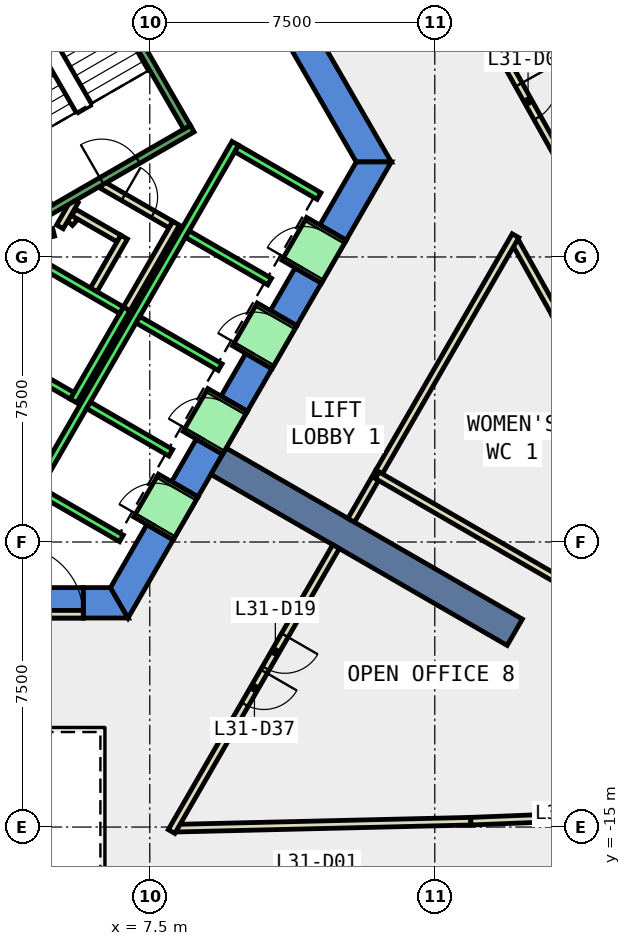
"""IFC4 building model, lengths in metres.
Left out: names, types, materials, properties, quantities, classifications, styles, units other than length and angle.
Written with IfcOpenShell. Run it as: python <this file> out.ifc"""

import sys

from ifc_helpers import new_model, si_unit, direction, frame, frame_2d, origin, place, context, subcontext, project, spatial, polyline, rectangle, outline, extrude, element, fill, save


model = new_model("IFC4")
c1 = context("Model", 3, precision=1e-05, world=origin(), true_north=direction((0.0, 1.0)))
c2 = subcontext(c1, "Body", "Model", "MODEL_VIEW")
j1 = project(units=[si_unit("LENGTHUNIT", "METRE"), si_unit("PLANEANGLEUNIT", "RADIAN")], contexts=[c1])
p1 = place(None, origin())
s1 = spatial("IfcSite", under=j1, at=p1, CompositionType="ELEMENT")
p2 = place(p1, origin())
s2 = spatial("IfcBuilding", under=s1, at=p2, CompositionType="ELEMENT")
p3 = place(p2, frame((0.0, 0.0, 142.4)))
s3 = spatial("IfcBuildingStorey", under=s2, at=p3, CompositionType="ELEMENT", Elevation=142.4)
p4 = place(p3, frame((0.0, 0.0, -0.4)))
e1 = element("IfcWall", 1, at=p4, inside=s3, PredefinedType="SHEAR", context=c2, shape_type="SweptSolid", body=[
    extrude(outline(polyline([(8.517, 11.748), (7.824, 11.348), (12.933, 2.5), (13.856, 2.5), (8.517, 11.748)])), origin(), (0.0, 0.0, 1.0), 4.2),
])
p5 = place(p3, frame((0.0, 0.0, -0.4)))
e2 = element("IfcWall", 2, at=p5, inside=s3, PredefinedType="SHEAR", context=c2, shape_type="SweptSolid", body=[
    extrude(outline(polyline([(5.75, -8.7), (5.75, -9.5), (6.928, -9.5), (6.466, -8.7), (5.75, -8.7)])), origin(), (0.0, 0.0, 1.0), 4.2),
])
p6 = place(p3, frame((0.0, 0.0, 3.6)))
e3 = element("IfcWall", 3, at=p6, inside=s3, PredefinedType="SHEAR", context=c2, shape_type="SweptSolid", body=[
    extrude(outline(polyline([(5.75, -9.5), (5.75, -8.7), (3.75, -8.7), (3.75, -9.5), (5.75, -9.5)])), origin(), (0.0, 0.0, 1.0), 0.2),
])
p7 = place(p3, frame((0.0, 0.0, -0.4)))
e4 = element("IfcWall", 4, at=p7, inside=s3, PredefinedType="SHEAR", context=c2, shape_type="SweptSolid", body=[
    extrude(outline(polyline([(8.117, -7.44), (7.424, -7.04), (6.466, -8.7), (6.928, -9.5), (8.117, -7.44)])), origin(), (0.0, 0.0, 1.0), 4.2),
])
p8 = place(p3, frame((0.0, 0.0, -0.4)))
e5 = element("IfcWall", 5, at=p8, inside=s3, PredefinedType="SHEAR", context=c2, shape_type="SweptSolid", body=[
    extrude(outline(polyline([(9.417, -5.189), (8.724, -4.789), (8.075, -5.914), (8.767, -6.314), (9.417, -5.189)])), origin(), (0.0, 0.0, 1.0), 4.2),
])
p9 = place(p3, frame((0.0, 0.0, -0.4)))
e6 = element("IfcWall", 6, at=p9, inside=s3, PredefinedType="SHEAR", context=c2, shape_type="SweptSolid", body=[
    extrude(outline(polyline([(10.717, -2.937), (10.025, -2.537), (9.374, -3.663), (10.067, -4.063), (10.717, -2.937)])), origin(), (0.0, 0.0, 1.0), 4.2),
])
p10 = place(p3, frame((0.0, 0.0, -0.4)))
e7 = element("IfcWall", 7, at=p10, inside=s3, PredefinedType="SHEAR", context=c2, shape_type="SweptSolid", body=[
    extrude(outline(polyline([(12.017, -0.686), (11.324, -0.286), (10.675, -1.411), (11.367, -1.811), (12.017, -0.686)])), origin(), (0.0, 0.0, 1.0), 4.2),
])
p11 = place(p3, frame((0.0, 0.0, -0.4)))
e8 = element("IfcWall", 8, at=p11, inside=s3, PredefinedType="SHEAR", context=c2, shape_type="SweptSolid", body=[
    extrude(outline(polyline([(11.974, 0.84), (12.667, 0.44), (13.856, 2.5), (12.933, 2.5), (11.974, 0.84)])), origin(), (0.0, 0.0, 1.0), 4.2),
])
p12 = place(p3, frame((0.0, 0.0, 3.6)))
e9 = element("IfcWall", 9, at=p12, inside=s3, PredefinedType="SHEAR", context=c2, shape_type="SweptSolid", body=[
    extrude(outline(polyline([(8.767, -6.314), (8.075, -5.914), (7.424, -7.04), (8.117, -7.44), (8.767, -6.314)])), origin(), (0.0, 0.0, 1.0), 0.2),
])
p13 = place(p3, frame((0.0, 0.0, 3.6)))
e10 = element("IfcWall", 10, at=p13, inside=s3, PredefinedType="SHEAR", context=c2, shape_type="SweptSolid", body=[
    extrude(outline(polyline([(10.067, -4.063), (9.374, -3.663), (8.724, -4.789), (9.417, -5.189), (10.067, -4.063)])), origin(), (0.0, 0.0, 1.0), 0.2),
])
p14 = place(p3, frame((0.0, 0.0, 3.6)))
e11 = element("IfcWall", 11, at=p14, inside=s3, PredefinedType="SHEAR", context=c2, shape_type="SweptSolid", body=[
    extrude(outline(polyline([(11.367, -1.811), (10.675, -1.411), (10.025, -2.537), (10.717, -2.937), (11.367, -1.811)])), origin(), (0.0, 0.0, 1.0), 0.2),
])
p15 = place(p3, frame((0.0, 0.0, 3.6)))
e12 = element("IfcWall", 12, at=p15, inside=s3, PredefinedType="SHEAR", context=c2, shape_type="SweptSolid", body=[
    extrude(outline(polyline([(12.667, 0.44), (11.974, 0.84), (11.324, -0.286), (12.017, -0.686), (12.667, 0.44)])), origin(), (0.0, 0.0, 1.0), 0.2),
])
p16 = place(p3, frame((9.31, -5.375, -0.4), z_axis=(0.0, 0.0, 1.0), x_axis=(0.866017533419, -0.500013631625, 0.0)))
e13 = element("IfcWall", 13, at=p16, inside=s3, PredefinedType="SHEAR", context=c2, shape_type="SweptSolid", body=[
    extrude(rectangle(XDim=9.0, YDim=0.8, at=frame_2d((4.5, 0.0))), origin(), (0.0, 0.0, 1.0), 4.2),
])
p17 = place(p3, frame((8.223, -15.029, 0.0), z_axis=(0.0, 0.0, 1.0), x_axis=(0.99971920994, 0.023696018186, 0.0)))
e14 = element("IfcWall", 14, at=p17, inside=s3, PredefinedType="PARTITIONING", context=c2, shape_type="SweptSolid", body=[
    extrude(rectangle(XDim=7.727, YDim=0.2, at=frame_2d((3.864, 0.0))), origin(), (0.0, 0.0, 1.0), 3.8),
])
p18 = place(p3, frame((15.948, -14.846, 0.0), z_axis=(0.0, 0.0, 1.0), x_axis=(0.999208477774, 0.039779617206, 0.0)))
e15 = element("IfcWall", 15, at=p18, inside=s3, PredefinedType="PARTITIONING", context=c2, shape_type="SweptSolid", body=[
    extrude(rectangle(XDim=2.639, YDim=0.2, at=frame_2d((1.32, 0.0))), origin(), (0.0, 0.0, 1.0), 3.8),
])
p19 = place(p3, frame((18.178, -1.501, 0.0), z_axis=(0.0, 0.0, 1.0), x_axis=(-0.487980809747, 0.872854357449, 0.0)))
e16 = element("IfcWall", 16, at=p19, inside=s3, PredefinedType="PARTITIONING", context=c2, shape_type="SweptSolid", body=[
    extrude(rectangle(XDim=2.162, YDim=0.2, at=frame_2d((1.081, 0.0))), origin(), (0.0, 0.0, 1.0), 3.8),
])
p20 = place(p3, frame((16.624, 5.582, 0.0), z_axis=(0.0, 0.0, 1.0), x_axis=(0.487871212611, -0.872915620152, 0.0)))
e17 = element("IfcWall", 17, at=p20, inside=s3, PredefinedType="PARTITIONING", context=c2, shape_type="SweptSolid", body=[
    extrude(rectangle(XDim=3.402, YDim=0.2, at=frame_2d((1.701, 0.0))), origin(), (0.0, 0.0, 1.0), 3.8),
])
p21 = place(p20, frame((1.202, 0.0, 0.0)))
e18 = element("IfcOpeningElement", 18, at=p21, cuts=e17, PredefinedType="OPENING", context=c2, shape_type="SweptSolid", body=[
    extrude(rectangle(XDim=1.0, YDim=2.1, at=frame_2d((0.5, 1.05))), frame((0.0, 0.11, 0.0), z_axis=(0.0, -1.0, 0.0), x_axis=(1.0, 0.0, 0.0)), (0.0, 0.0, 1.0), 0.22),
])
p22 = place(p3, frame((5.39, 0.898, 0.0), z_axis=(0.0, 0.0, 1.0), x_axis=(0.673828488714, 0.738887791073, 0.0)))
e19 = element("IfcWall", 19, at=p22, inside=s3, PredefinedType="PARTITIONING", context=c2, shape_type="SweptSolid", body=[
    extrude(rectangle(XDim=0.263, YDim=0.2, at=frame_2d((0.131, 0.0))), origin(), (0.0, 0.0, 1.0), 3.8),
])
p23 = place(p3, frame((5.499, 1.172, 0.0), z_axis=(0.0, 0.0, 1.0), x_axis=(0.866333505267, -0.499465972466, 0.0)))
e20 = element("IfcWall", 20, at=p23, inside=s3, PredefinedType="PARTITIONING", context=c2, shape_type="SweptSolid", body=[
    extrude(rectangle(XDim=1.374, YDim=0.2, at=frame_2d((0.687, 0.0))), origin(), (0.0, 0.0, 1.0), 3.8),
])
p24 = place(p3, frame((6.826, 0.522, 0.0), z_axis=(0.0, 0.0, 1.0), x_axis=(-0.500016722714, -0.866015748706, 0.0)))
e21 = element("IfcWall", 21, at=p24, inside=s3, PredefinedType="PARTITIONING", context=c2, shape_type="SweptSolid", body=[
    extrude(rectangle(XDim=1.7, YDim=0.2, at=frame_2d((0.85, 0.0))), origin(), (0.0, 0.0, 1.0), 3.8),
])
p25 = place(p3, frame((6.25, 1.894, 0.0), z_axis=(0.0, 0.0, 1.0), x_axis=(0.866043184279, -0.499969202016, 0.0)))
e22 = element("IfcWall", 22, at=p25, inside=s3, PredefinedType="PARTITIONING", context=c2, shape_type="SweptSolid", body=[
    extrude(rectangle(XDim=2.084, YDim=0.2, at=frame_2d((1.042, 0.0))), origin(), (0.0, 0.0, 1.0), 3.8),
])
p26 = place(p25, frame((0.642, 0.0, 0.0)))
e23 = element("IfcOpeningElement", 23, at=p26, cuts=e22, PredefinedType="OPENING", context=c2, shape_type="SweptSolid", body=[
    extrude(rectangle(XDim=0.9, YDim=2.1, at=frame_2d((0.45, 1.05))), frame((0.0, 0.11, 0.0), z_axis=(0.0, -1.0, 0.0), x_axis=(1.0, 0.0, 0.0)), (0.0, 0.0, 1.0), 0.22),
])
p27 = place(p3, frame((8.192, 0.888, 0.0), z_axis=(0.0, 0.0, 1.0), x_axis=(-0.499940625693, -0.866059680843, 0.0)))
e24 = element("IfcWall", 24, at=p27, inside=s3, PredefinedType="PARTITIONING", context=c2, shape_type="SweptSolid", body=[
    extrude(rectangle(XDim=2.68, YDim=0.2, at=frame_2d((1.34, 0.0))), origin(), (0.0, 0.0, 1.0), 3.8),
])
p28 = place(p3, frame((5.135, 0.793, 0.0), z_axis=(0.0, 0.0, 1.0), x_axis=(0.499526442893, 0.866298639529, 0.0)))
e25 = element("IfcWall", 25, at=p28, inside=s3, PredefinedType="PARTITIONING", context=c2, shape_type="SweptSolid", body=[
    extrude(rectangle(XDim=0.791, YDim=0.2, at=frame_2d((0.396, 0.0))), origin(), (0.0, 0.0, 1.0), 3.8),
])
p29 = place(p3, frame((4.644, 0.564, 0.0), z_axis=(0.0, 0.0, 1.0), x_axis=(0.969929076366, 0.243387729394, 0.0)))
e26 = element("IfcWall", 26, at=p29, inside=s3, PredefinedType="PARTITIONING", context=c2, shape_type="SweptSolid", body=[
    extrude(rectangle(XDim=0.337, YDim=0.2, at=frame_2d((0.168, 0.0))), origin(), (0.0, 0.0, 1.0), 3.8),
])
p30 = place(p3, frame((13.535, -5.657, 0.0), z_axis=(0.0, 0.0, 1.0), x_axis=(-0.499751238113, -0.866168978898, 0.0)))
e27 = element("IfcWall", 27, at=p30, inside=s3, PredefinedType="PARTITIONING", context=c2, shape_type="SweptSolid", body=[
    extrude(rectangle(XDim=1.469, YDim=0.2, at=frame_2d((0.734, 0.0))), origin(), (0.0, 0.0, 1.0), 3.8),
])
p31 = place(p3, frame((17.124, 0.56, 0.0), z_axis=(0.0, 0.0, 1.0), x_axis=(-0.49996876383, -0.866043437245, 0.0)))
e28 = element("IfcWall", 28, at=p31, inside=s3, PredefinedType="PARTITIONING", context=c2, shape_type="SweptSolid", body=[
    extrude(rectangle(XDim=7.179, YDim=0.2, at=frame_2d((3.589, 0.0))), origin(), (0.0, 0.0, 1.0), 3.8),
])
p32 = place(p3, frame((13.485, -5.744, 0.0), z_axis=(0.0, 0.0, 1.0), x_axis=(0.865950545648, -0.500129635687, 0.0)))
e29 = element("IfcWall", 29, at=p32, inside=s3, PredefinedType="PARTITIONING", context=c2, shape_type="SweptSolid", body=[
    extrude(rectangle(XDim=9.1, YDim=0.2, at=frame_2d((4.55, 0.0))), origin(), (0.0, 0.0, 1.0), 3.8),
])
p33 = place(p3, frame((3.75, -9.4, 0.0), z_axis=(0.0, 0.0, 1.0), x_axis=(1.0, 0.0, 0.0)))
e30 = element("IfcWall", 30, at=p33, inside=s3, PredefinedType="PARTITIONING", context=c2, shape_type="SweptSolid", body=[
    extrude(rectangle(XDim=2.0, YDim=0.2, at=frame_2d((1.0, 0.0))), origin(), (0.0, 0.0, 1.0), 2.4),
])
p34 = place(p33, frame((0.19, 0.0, 0.0)))
e31 = element("IfcOpeningElement", 31, at=p34, cuts=e30, PredefinedType="OPENING", context=c2, shape_type="SweptSolid", body=[
    extrude(rectangle(XDim=1.8, YDim=2.1, at=frame_2d((0.9, 1.05))), frame((0.0, 0.11, 0.0), z_axis=(0.0, -1.0, 0.0), x_axis=(1.0, 0.0, 0.0)), (0.0, 0.0, 1.0), 0.22),
])
p35 = place(p3, frame((12.401, -7.621, 0.0), z_axis=(0.0, 0.0, 1.0), x_axis=(-0.499964151829, -0.866046099747, 0.0)))
e32 = element("IfcWall", 32, at=p35, inside=s3, PredefinedType="PARTITIONING", context=c2, shape_type="SweptSolid", body=[
    extrude(rectangle(XDim=8.656, YDim=0.2, at=frame_2d((4.328, 0.0))), origin(), (0.0, 0.0, 1.0), 3.8),
])
p36 = place(p35, frame((2.694, 0.0, 0.0)))
e33 = element("IfcOpeningElement", 33, at=p36, cuts=e32, PredefinedType="OPENING", context=c2, shape_type="SweptSolid", body=[
    extrude(rectangle(XDim=1.0, YDim=2.1, at=frame_2d((0.5, 1.05))), frame((0.0, 0.11, 0.0), z_axis=(0.0, -1.0, 0.0), x_axis=(1.0, 0.0, 0.0)), (0.0, 0.0, 1.0), 0.22),
])
p37 = place(p35, frame((3.794, 0.0, 0.0)))
e34 = element("IfcOpeningElement", 34, at=p37, cuts=e32, PredefinedType="OPENING", context=c2, shape_type="SweptSolid", body=[
    extrude(rectangle(XDim=1.0, YDim=2.1, at=frame_2d((0.5, 1.05))), frame((0.0, 0.11, 0.0), z_axis=(0.0, -1.0, 0.0), x_axis=(1.0, 0.0, 0.0)), (0.0, 0.0, 1.0), 0.22),
])
p38 = place(p3, frame((5.492, -3.788, 0.0), z_axis=(0.0, 0.0, 1.0), x_axis=(0.500011755427, 0.866018616679, 0.0)))
e35 = element("IfcWall", 35, at=p38, inside=s3, PredefinedType="STANDARD", context=c2, shape_type="SweptSolid", body=[
    extrude(rectangle(XDim=2.8, YDim=0.2, at=frame_2d((1.4, 0.0))), origin(), (0.0, 0.0, 1.0), 3.8),
])
p39 = place(p3, frame((3.377, -2.452, 0.0), z_axis=(0.0, 0.0, 1.0), x_axis=(0.865955154139, -0.50012165622, 0.0)))
e36 = element("IfcWall", 36, at=p39, inside=s3, PredefinedType="STANDARD", context=c2, shape_type="SweptSolid", body=[
    extrude(rectangle(XDim=2.4, YDim=0.2, at=frame_2d((1.2, 0.0))), origin(), (0.0, 0.0, 1.0), 3.8),
])
p40 = place(p3, frame((4.677, -0.2, 0.0), z_axis=(0.0, 0.0, 1.0), x_axis=(0.865973769406, -0.500089422704, 0.0)))
e37 = element("IfcWall", 37, at=p40, inside=s3, PredefinedType="STANDARD", context=c2, shape_type="SweptSolid", body=[
    extrude(rectangle(XDim=2.399, YDim=0.2, at=frame_2d((1.2, 0.0))), origin(), (0.0, 0.0, 1.0), 3.8),
])
p41 = place(p3, frame((4.451, -6.19, 0.0), z_axis=(0.0, 0.0, 1.0), x_axis=(0.50000090737, 0.866024879913, 0.0)))
e38 = element("IfcWall", 38, at=p41, inside=s3, PredefinedType="STANDARD", context=c2, shape_type="SweptSolid", body=[
    extrude(rectangle(XDim=10.6, YDim=0.2, at=frame_2d((5.3, 0.0))), origin(), (0.0, 0.0, 1.0), 3.8),
])
for number, where, z_axis, x_axis in (
    (39, (4.588, -6.153, 0.0), (0.0, 0.0, 1.0), (0.866, -0.5, 0.0)),
    (40, (5.888, -3.902, 0.0), (0.0, 0.0, 1.0), (0.866, -0.5, 0.0)),
    (41, (7.188, -1.65, 0.0), (0.0, 0.0, 1.0), (0.866, -0.5, 0.0)),
    (42, (8.488, 0.602, 0.0), (0.0, 0.0, 1.0), (0.866, -0.5, 0.0)),
):
    element("IfcWall", number, at=place(p3, frame(where, z_axis=z_axis, x_axis=x_axis)), inside=s3, PredefinedType="STANDARD", context=c2, shape_type="SweptSolid", body=[
        extrude(rectangle(XDim=2.5, YDim=0.2, at=frame_2d((1.25, 0.0))), origin(), (0.0, 0.0, 1.0), 3.8),
    ])
p42 = place(p3, frame((9.788, 2.853, 0.0), z_axis=(0.0, 0.0, 1.0), x_axis=(0.865998541277, -0.500046524342, 0.0)))
e43 = element("IfcWall", 43, at=p42, inside=s3, PredefinedType="STANDARD", context=c2, shape_type="SweptSolid", body=[
    extrude(rectangle(XDim=2.5, YDim=0.2, at=frame_2d((1.25, 0.0))), origin(), (0.0, 0.0, 1.0), 3.8),
])
p43 = place(p3, frame((7.598, -7.14, 0.0), z_axis=(0.0, 0.0, 1.0), x_axis=(0.500362116554, 0.865816234728, 0.0)))
e44 = element("IfcWall", 44, at=p43, inside=s3, PredefinedType="STANDARD", context=c2, shape_type="SweptSolid", body=[
    extrude(rectangle(XDim=1.299, YDim=1.2, at=frame_2d((0.65, 0.0))), origin(), (0.0, 0.0, 1.0), 2.4),
])
p44 = place(p43, frame((0.1, 0.0, 0.0)))
e45 = element("IfcOpeningElement", 45, at=p44, cuts=e44, PredefinedType="OPENING", context=c2, shape_type="SweptSolid", body=[
    extrude(rectangle(XDim=1.1, YDim=2.3, at=frame_2d((0.55, 1.15))), frame((0.0, 0.61, 0.0), z_axis=(0.0, -1.0, 0.0), x_axis=(1.0, 0.0, 0.0)), (0.0, 0.0, 1.0), 1.22),
])
p45 = place(p3, frame((8.898, -4.889, 0.0), z_axis=(0.0, 0.0, 1.0), x_axis=(0.500036693733, 0.866004217611, 0.0)))
e46 = element("IfcWall", 46, at=p45, inside=s3, PredefinedType="STANDARD", context=c2, shape_type="SweptSolid", body=[
    extrude(rectangle(XDim=1.3, YDim=1.2, at=frame_2d((0.65, 0.0))), origin(), (0.0, 0.0, 1.0), 2.4),
])
p46 = place(p45, frame((0.1, 0.0, 0.0)))
e47 = element("IfcOpeningElement", 47, at=p46, cuts=e46, PredefinedType="OPENING", context=c2, shape_type="SweptSolid", body=[
    extrude(rectangle(XDim=1.1, YDim=2.3, at=frame_2d((0.55, 1.15))), frame((0.0, 0.61, 0.0), z_axis=(0.0, -1.0, 0.0), x_axis=(1.0, 0.0, 0.0)), (0.0, 0.0, 1.0), 1.22),
])
p47 = place(p3, frame((10.198, -2.637, 0.0), z_axis=(0.0, 0.0, 1.0), x_axis=(0.49989585183, 0.866085525409, 0.0)))
e48 = element("IfcWall", 48, at=p47, inside=s3, PredefinedType="STANDARD", context=c2, shape_type="SweptSolid", body=[
    extrude(rectangle(XDim=1.3, YDim=1.2, at=frame_2d((0.65, 0.0))), origin(), (0.0, 0.0, 1.0), 2.4),
])
p48 = place(p47, frame((0.1, 0.0, 0.0)))
e49 = element("IfcOpeningElement", 49, at=p48, cuts=e48, PredefinedType="OPENING", context=c2, shape_type="SweptSolid", body=[
    extrude(rectangle(XDim=1.1, YDim=2.3, at=frame_2d((0.55, 1.15))), frame((0.0, 0.61, 0.0), z_axis=(0.0, -1.0, 0.0), x_axis=(1.0, 0.0, 0.0)), (0.0, 0.0, 1.0), 1.22),
])
p49 = place(p3, frame((11.498, -0.385, 0.0), z_axis=(0.0, 0.0, 1.0), x_axis=(0.500221244143, 0.865897630733, 0.0)))
e50 = element("IfcWall", 50, at=p49, inside=s3, PredefinedType="STANDARD", context=c2, shape_type="SweptSolid", body=[
    extrude(rectangle(XDim=1.299, YDim=1.2, at=frame_2d((0.65, 0.0))), origin(), (0.0, 0.0, 1.0), 2.4),
])
p50 = place(p49, frame((0.1, 0.0, 0.0)))
e51 = element("IfcOpeningElement", 51, at=p50, cuts=e50, PredefinedType="OPENING", context=c2, shape_type="SweptSolid", body=[
    extrude(rectangle(XDim=1.1, YDim=2.3, at=frame_2d((0.55, 1.15))), frame((0.0, 0.61, 0.0), z_axis=(0.0, -1.0, 0.0), x_axis=(1.0, 0.0, 0.0)), (0.0, 0.0, 1.0), 1.22),
])
p51 = place(p3, frame((4.806, 1.176, 0.0), z_axis=(0.0, 0.0, 1.0), x_axis=(0.866059941101, 0.499940174841, 0.0)))
e52 = element("IfcWall", 52, at=p51, inside=s3, PredefinedType="STANDARD", context=c2, shape_type="SweptSolid", body=[
    extrude(rectangle(XDim=4.4, YDim=0.2, at=frame_2d((2.2, 0.0))), origin(), (0.0, 0.0, 1.0), 3.8),
])
p52 = place(p51, frame((1.65, 0.0, 0.0)))
e53 = element("IfcOpeningElement", 53, at=p52, cuts=e52, PredefinedType="OPENING", context=c2, shape_type="SweptSolid", body=[
    extrude(rectangle(XDim=1.1, YDim=2.2, at=frame_2d((0.55, 1.1))), frame((0.0, 0.11, 0.0), z_axis=(0.0, -1.0, 0.0), x_axis=(1.0, 0.0, 0.0)), (0.0, 0.0, 1.0), 0.22),
])
p53 = place(p3, frame((8.48, 3.412, 0.0), z_axis=(0.0, 0.0, 1.0), x_axis=(-0.499978703459, 0.866037698999, 0.0)))
e54 = element("IfcWall", 54, at=p53, inside=s3, PredefinedType="STANDARD", context=c2, shape_type="SweptSolid", body=[
    extrude(rectangle(XDim=6.9, YDim=0.2, at=frame_2d((3.45, 0.0))), origin(), (0.0, 0.0, 1.0), 3.8),
])
p54 = place(p21, origin())
e55 = element("IfcDoor", 55, at=p54, inside=s3, OperationType="SINGLE_SWING_LEFT", PredefinedType="DOOR", context=c2, shape_type="SweptSolid", body=[
    extrude(rectangle(XDim=1.0, YDim=2.1, at=frame_2d((0.5, 1.05))), frame((0.0, 0.025, 0.0), z_axis=(0.0, -1.0, 0.0), x_axis=(1.0, 0.0, 0.0)), (0.0, 0.0, 1.0), 0.05),
])
fill(e18, e55)
p55 = place(p36, origin())
e56 = element("IfcDoor", 56, at=p55, inside=s3, OperationType="SINGLE_SWING_LEFT", PredefinedType="DOOR", context=c2, shape_type="SweptSolid", body=[
    extrude(rectangle(XDim=1.0, YDim=2.1, at=frame_2d((0.5, 1.05))), frame((0.0, 0.025, 0.0), z_axis=(0.0, -1.0, 0.0), x_axis=(1.0, 0.0, 0.0)), (0.0, 0.0, 1.0), 0.05),
])
fill(e33, e56)
p56 = place(p26, origin())
e57 = element("IfcDoor", 57, at=p56, inside=s3, OperationType="SINGLE_SWING_LEFT", PredefinedType="DOOR", context=c2, shape_type="SweptSolid", body=[
    extrude(rectangle(XDim=0.9, YDim=2.1, at=frame_2d((0.45, 1.05))), frame((0.0, 0.025, 0.0), z_axis=(0.0, -1.0, 0.0), x_axis=(1.0, 0.0, 0.0)), (0.0, 0.0, 1.0), 0.05),
])
fill(e23, e57)
p57 = place(p37, origin())
e58 = element("IfcDoor", 58, at=p57, inside=s3, OperationType="SINGLE_SWING_RIGHT", PredefinedType="DOOR", context=c2, shape_type="SweptSolid", body=[
    extrude(rectangle(XDim=1.0, YDim=2.1, at=frame_2d((0.5, 1.05))), frame((0.0, 0.025, 0.0), z_axis=(0.0, -1.0, 0.0), x_axis=(1.0, 0.0, 0.0)), (0.0, 0.0, 1.0), 0.05),
])
fill(e34, e58)
p58 = place(p34, origin())
e59 = element("IfcDoor", 59, at=p58, inside=s3, OperationType="DOUBLE_DOOR_SINGLE_SWING", PredefinedType="DOOR", context=c2, shape_type="SweptSolid", body=[
    extrude(rectangle(XDim=1.8, YDim=2.1, at=frame_2d((0.9, 1.05))), frame((0.0, 0.025, 0.0), z_axis=(0.0, -1.0, 0.0), x_axis=(1.0, 0.0, 0.0)), (0.0, 0.0, 1.0), 0.05),
])
fill(e31, e59)
p59 = place(p44, origin())
e60 = element("IfcDoor", 60, at=p59, inside=s3, OperationType="SLIDING_TO_LEFT", PredefinedType="DOOR", context=c2, shape_type="SweptSolid", body=[
    extrude(rectangle(XDim=1.1, YDim=2.3, at=frame_2d((0.55, 1.15))), frame((0.0, 0.025, 0.0), z_axis=(0.0, -1.0, 0.0), x_axis=(1.0, 0.0, 0.0)), (0.0, 0.0, 1.0), 0.05),
])
fill(e45, e60)
p60 = place(p46, origin())
e61 = element("IfcDoor", 61, at=p60, inside=s3, OperationType="SLIDING_TO_LEFT", PredefinedType="DOOR", context=c2, shape_type="SweptSolid", body=[
    extrude(rectangle(XDim=1.1, YDim=2.3, at=frame_2d((0.55, 1.15))), frame((0.0, 0.025, 0.0), z_axis=(0.0, -1.0, 0.0), x_axis=(1.0, 0.0, 0.0)), (0.0, 0.0, 1.0), 0.05),
])
fill(e47, e61)
p61 = place(p48, origin())
e62 = element("IfcDoor", 62, at=p61, inside=s3, OperationType="SLIDING_TO_LEFT", PredefinedType="DOOR", context=c2, shape_type="SweptSolid", body=[
    extrude(rectangle(XDim=1.1, YDim=2.3, at=frame_2d((0.55, 1.15))), frame((0.0, 0.025, 0.0), z_axis=(0.0, -1.0, 0.0), x_axis=(1.0, 0.0, 0.0)), (0.0, 0.0, 1.0), 0.05),
])
fill(e49, e62)
p62 = place(p50, origin())
e63 = element("IfcDoor", 63, at=p62, inside=s3, OperationType="SLIDING_TO_LEFT", PredefinedType="DOOR", context=c2, shape_type="SweptSolid", body=[
    extrude(rectangle(XDim=1.1, YDim=2.3, at=frame_2d((0.55, 1.15))), frame((0.0, 0.025, 0.0), z_axis=(0.0, -1.0, 0.0), x_axis=(1.0, 0.0, 0.0)), (0.0, 0.0, 1.0), 0.05),
])
fill(e51, e63)
p63 = place(p52, origin())
e64 = element("IfcDoor", 64, at=p63, inside=s3, OperationType="SINGLE_SWING_LEFT", PredefinedType="DOOR", context=c2, shape_type="SweptSolid", body=[
    extrude(rectangle(XDim=1.1, YDim=2.2, at=frame_2d((0.55, 1.1))), frame((0.0, 0.025, 0.0), z_axis=(0.0, -1.0, 0.0), x_axis=(1.0, 0.0, 0.0)), (0.0, 0.0, 1.0), 0.05),
])
fill(e53, e64)
save(model, sys.argv[1])
